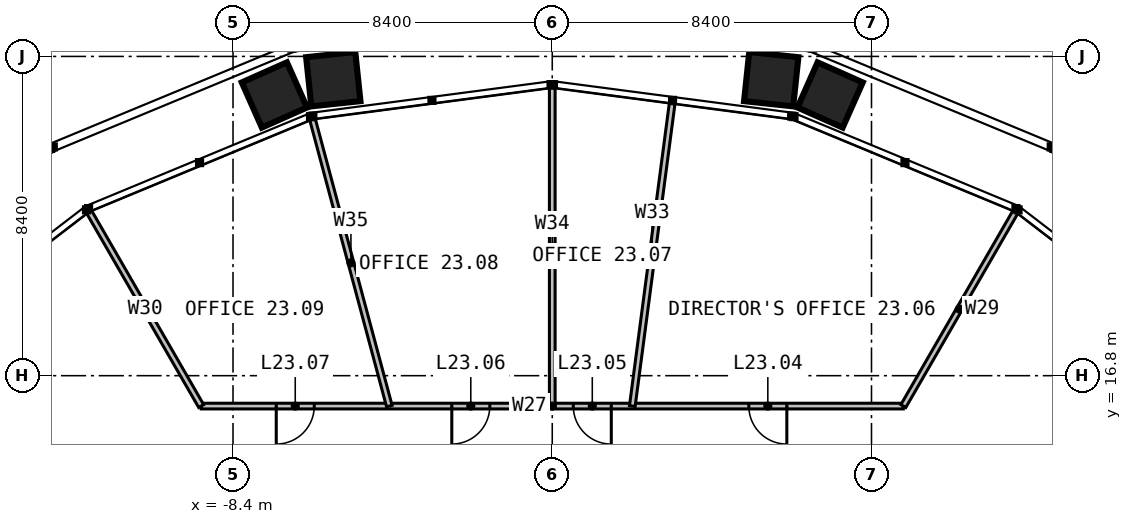
"""IFC4 building model, lengths in metres.
Left out: names, types, materials, properties, quantities, classifications, styles, units other than length and angle.
Written with IfcOpenShell. Run it as: python <this file> out.ifc"""

import sys

from ifc_helpers import new_model, si_unit, direction, frame, frame_2d, origin, place, context, subcontext, project, spatial, rectangle, extrude, element, fill, save


model = new_model("IFC4")
c1 = context("Model", 3, precision=1e-05, world=origin(), true_north=direction((0.0, 1.0)))
c2 = subcontext(c1, "Body", "Model", "MODEL_VIEW")
j1 = project(units=[si_unit("LENGTHUNIT", "METRE"), si_unit("PLANEANGLEUNIT", "RADIAN")], contexts=[c1])
p1 = place(None, origin())
s1 = spatial("IfcSite", under=j1, at=p1, CompositionType="ELEMENT")
p2 = place(p1, origin())
s2 = spatial("IfcBuilding", under=s1, at=p2, CompositionType="ELEMENT")
p3 = place(p2, frame((0.0, 0.0, 98.0)))
s3 = spatial("IfcBuildingStorey", under=s2, at=p3, CompositionType="ELEMENT", Elevation=98.0)
p4 = place(p3, frame((9.238, 16.0, 0.0), z_axis=(0.0, 0.0, 1.0), x_axis=(-1.0, 0.0, 0.0)))
e1 = element("IfcWall", 1, at=p4, inside=s3, PredefinedType="PARTITIONING", context=c2, shape_type="SweptSolid", body=[
    extrude(rectangle(XDim=18.475, YDim=0.15, at=frame_2d((9.238, 0.0))), origin(), (0.0, 0.0, 1.0), 2.79),
])
p5 = place(p4, frame((3.066, 0.0, 0.0)))
e2 = element("IfcOpeningElement", 2, at=p5, cuts=e1, PredefinedType="OPENING", context=c2, shape_type="SweptSolid", body=[
    extrude(rectangle(XDim=1.0, YDim=2.2, at=frame_2d((0.5, 1.1))), frame((0.0, 0.085, 0.0), z_axis=(0.0, -1.0, 0.0), x_axis=(1.0, 0.0, 0.0)), (0.0, 0.0, 1.0), 0.17),
])
p6 = place(p4, frame((7.684, 0.0, 0.0)))
e3 = element("IfcOpeningElement", 3, at=p6, cuts=e1, PredefinedType="OPENING", context=c2, shape_type="SweptSolid", body=[
    extrude(rectangle(XDim=1.0, YDim=2.2, at=frame_2d((0.5, 1.1))), frame((0.0, 0.085, 0.0), z_axis=(0.0, -1.0, 0.0), x_axis=(1.0, 0.0, 0.0)), (0.0, 0.0, 1.0), 0.17),
])
p7 = place(p4, frame((10.881, 0.0, 0.0)))
e4 = element("IfcOpeningElement", 4, at=p7, cuts=e1, PredefinedType="OPENING", context=c2, shape_type="SweptSolid", body=[
    extrude(rectangle(XDim=1.0, YDim=2.2, at=frame_2d((0.5, 1.1))), frame((0.0, 0.085, 0.0), z_axis=(0.0, -1.0, 0.0), x_axis=(1.0, 0.0, 0.0)), (0.0, 0.0, 1.0), 0.17),
])
p8 = place(p4, frame((15.5, 0.0, 0.0)))
e5 = element("IfcOpeningElement", 5, at=p8, cuts=e1, PredefinedType="OPENING", context=c2, shape_type="SweptSolid", body=[
    extrude(rectangle(XDim=1.0, YDim=2.2, at=frame_2d((0.5, 1.1))), frame((0.0, 0.085, 0.0), z_axis=(0.0, -1.0, 0.0), x_axis=(1.0, 0.0, 0.0)), (0.0, 0.0, 1.0), 0.17),
])
for number, where, z_axis, x_axis in (
    (6, (9.238, 16.0, 0.0), (0.0, 0.0, 1.0), (0.5, 0.866, 0.0)),
    (7, (-9.238, 16.0, 0.0), (0.0, 0.0, 1.0), (-0.5, 0.866, 0.0)),
):
    element("IfcWall", number, at=place(p3, frame(where, z_axis=z_axis, x_axis=x_axis)), inside=s3, PredefinedType="PARTITIONING", context=c2, shape_type="SweptSolid", body=[
        extrude(rectangle(XDim=5.895, YDim=0.15, at=frame_2d((2.948, 0.0))), origin(), (0.0, 0.0, 1.0), 2.79),
    ])
p9 = place(p3, frame((2.106, 16.0, 0.0), z_axis=(0.0, 0.0, 1.0), x_axis=(0.130533221372, 0.991443935943, 0.0)))
e8 = element("IfcWall", 8, at=p9, inside=s3, PredefinedType="PARTITIONING", context=c2, shape_type="SweptSolid", body=[
    extrude(rectangle(XDim=8.024, YDim=0.15, at=frame_2d((4.012, 0.0))), origin(), (0.0, 0.0, 1.0), 2.79),
])
p10 = place(p3, frame((0.0, 16.0, 0.0), z_axis=(0.0, 0.0, 1.0), x_axis=(0.0, 1.0, 0.0)))
e9 = element("IfcWall", 9, at=p10, inside=s3, PredefinedType="PARTITIONING", context=c2, shape_type="SweptSolid", body=[
    extrude(rectangle(XDim=8.37, YDim=0.15, at=frame_2d((4.185, 0.0))), origin(), (0.0, 0.0, 1.0), 2.79),
])
p11 = place(p3, frame((-4.287, 16.0, 0.0), z_axis=(0.0, 0.0, 1.0), x_axis=(-0.258816859097, 0.965926412025, 0.0)))
e10 = element("IfcWall", 10, at=p11, inside=s3, PredefinedType="PARTITIONING", context=c2, shape_type="SweptSolid", body=[
    extrude(rectangle(XDim=7.806, YDim=0.15, at=frame_2d((3.903, 0.0))), origin(), (0.0, 0.0, 1.0), 2.79),
])
p12 = place(p5, origin())
e11 = element("IfcDoor", 11, at=p12, inside=s3, OperationType="SINGLE_SWING_LEFT", PredefinedType="DOOR", context=c2, shape_type="SweptSolid", body=[
    extrude(rectangle(XDim=1.0, YDim=2.2, at=frame_2d((0.5, 1.1))), frame((0.0, 0.025, 0.0), z_axis=(0.0, -1.0, 0.0), x_axis=(1.0, 0.0, 0.0)), (0.0, 0.0, 1.0), 0.05),
])
fill(e2, e11)
p13 = place(p6, origin())
e12 = element("IfcDoor", 12, at=p13, inside=s3, OperationType="SINGLE_SWING_LEFT", PredefinedType="DOOR", context=c2, shape_type="SweptSolid", body=[
    extrude(rectangle(XDim=1.0, YDim=2.2, at=frame_2d((0.5, 1.1))), frame((0.0, 0.025, 0.0), z_axis=(0.0, -1.0, 0.0), x_axis=(1.0, 0.0, 0.0)), (0.0, 0.0, 1.0), 0.05),
])
fill(e3, e12)
p14 = place(p7, origin())
e13 = element("IfcDoor", 13, at=p14, inside=s3, OperationType="SINGLE_SWING_RIGHT", PredefinedType="DOOR", context=c2, shape_type="SweptSolid", body=[
    extrude(rectangle(XDim=1.0, YDim=2.2, at=frame_2d((0.5, 1.1))), frame((0.0, 0.025, 0.0), z_axis=(0.0, -1.0, 0.0), x_axis=(1.0, 0.0, 0.0)), (0.0, 0.0, 1.0), 0.05),
])
fill(e4, e13)
p15 = place(p8, origin())
e14 = element("IfcDoor", 14, at=p15, inside=s3, OperationType="SINGLE_SWING_RIGHT", PredefinedType="DOOR", context=c2, shape_type="SweptSolid", body=[
    extrude(rectangle(XDim=1.0, YDim=2.2, at=frame_2d((0.5, 1.1))), frame((0.0, 0.025, 0.0), z_axis=(0.0, -1.0, 0.0), x_axis=(1.0, 0.0, 0.0)), (0.0, 0.0, 1.0), 0.05),
])
fill(e5, e14)
save(model, sys.argv[1])
